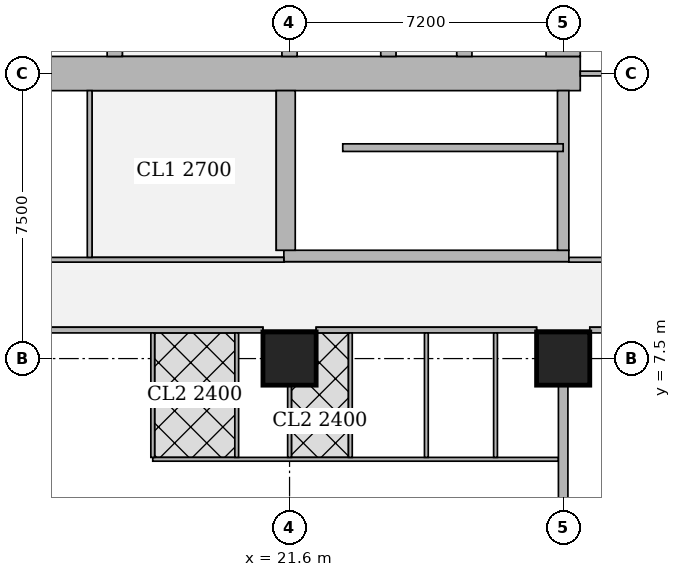
"""IFC4 building model, lengths in metres.
Left out: names, types, materials, properties, quantities, classifications, styles, units other than length and angle.
Written with IfcOpenShell. Run it as: python <this file> out.ifc"""

import sys

from ifc_helpers import new_model, si_unit, direction, frame, frame_2d, origin, origin_2d, place, context, subcontext, project, spatial, rectangle, extrude, element, fill, save


model = new_model("IFC4")
c1 = context("Model", 3, precision=1e-05, world=origin(), true_north=direction((0.0, 1.0)))
c2 = subcontext(c1, "Body", "Model", "MODEL_VIEW")
j1 = project(units=[si_unit("LENGTHUNIT", "METRE"), si_unit("PLANEANGLEUNIT", "RADIAN")], contexts=[c1])
p1 = place(None, origin())
s1 = spatial("IfcSite", under=j1, at=p1, CompositionType="ELEMENT")
p2 = place(p1, origin())
s2 = spatial("IfcBuilding", under=s1, at=p2, CompositionType="ELEMENT")
p3 = place(p2, frame((0.0, 0.0, 193.7)))
s3 = spatial("IfcBuildingStorey", under=s2, at=p3, CompositionType="ELEMENT", Elevation=193.7)
for number, where, z_axis, x_axis in (
    (1, (21.6, 7.5, 0.0), (0.0, 0.0, 1.0), (1.0, 0.0, 0.0)),
    (2, (28.8, 7.5, 0.0), (0.0, 0.0, 1.0), (1.0, 0.0, 0.0)),
):
    element("IfcColumn", number, at=place(p3, frame(where, z_axis=z_axis, x_axis=x_axis)), inside=s3, PredefinedType="COLUMN", context=c2, shape_type="SweptSolid", body=[
        extrude(rectangle(XDim=1.4, YDim=1.4, at=origin_2d()), origin(), (0.0, 0.0, 1.0), 3.75),
    ])
p4 = place(p3, frame((13.95, 15.0, 0.0), z_axis=(0.0, 0.0, 1.0), x_axis=(1.0, 0.0, 0.0)))
e3 = element("IfcWall", 3, at=p4, inside=s3, PredefinedType="SHEAR", context=c2, shape_type="SweptSolid", body=[
    extrude(rectangle(XDim=15.3, YDim=0.9, at=frame_2d((7.65, 0.0))), origin(), (0.0, 0.0, 1.0), 3.75),
])
p5 = place(p4, frame((4.45, 0.0, 0.0)))
e4 = element("IfcOpeningElement", 4, at=p5, cuts=e3, PredefinedType="OPENING", context=c2, shape_type="SweptSolid", body=[
    extrude(rectangle(XDim=1.8, YDim=2.1, at=frame_2d((0.9, 1.05))), frame((0.0, 0.46, 0.0), z_axis=(0.0, -1.0, 0.0), x_axis=(1.0, 0.0, 0.0)), (0.0, 0.0, 1.0), 0.92),
])
p6 = place(p4, frame((10.7, 0.0, 0.0)))
e5 = element("IfcOpeningElement", 5, at=p6, cuts=e3, PredefinedType="OPENING", context=c2, shape_type="SweptSolid", body=[
    extrude(rectangle(XDim=1.1, YDim=2.1, at=frame_2d((0.55, 1.05))), frame((0.0, 0.46, 0.0), z_axis=(0.0, -1.0, 0.0), x_axis=(1.0, 0.0, 0.0)), (0.0, 0.0, 1.0), 0.92),
])
p7 = place(p3, frame((28.8, 15.45, 0.0), z_axis=(0.0, 0.0, 1.0), x_axis=(0.0, 1.0, 0.0)))
e6 = element("IfcWall", 6, at=p7, inside=s3, PredefinedType="SHEAR", context=c2, shape_type="SweptSolid", body=[
    extrude(rectangle(XDim=14.1, YDim=0.9, at=frame_2d((7.05, 0.0))), origin(), (0.0, 0.0, 1.0), 3.75),
])
p8 = place(p3, frame((17.0, 15.45, 0.0), z_axis=(0.0, 0.0, 1.0), x_axis=(0.0, 1.0, 0.0)))
e7 = element("IfcWall", 7, at=p8, inside=s3, PredefinedType="SHEAR", context=c2, shape_type="SweptSolid", body=[
    extrude(rectangle(XDim=14.1, YDim=0.4, at=frame_2d((7.05, 0.0))), origin(), (0.0, 0.0, 1.0), 3.75),
])
p9 = place(p8, frame((0.925, 0.0, 0.0)))
e8 = element("IfcOpeningElement", 8, at=p9, cuts=e7, PredefinedType="OPENING", context=c2, shape_type="SweptSolid", body=[
    extrude(rectangle(XDim=1.0, YDim=2.1, at=frame_2d((0.5, 1.05))), frame((0.0, 0.21, 0.0), z_axis=(0.0, -1.0, 0.0), x_axis=(1.0, 0.0, 0.0)), (0.0, 0.0, 1.0), 0.42),
])
p10 = place(p8, frame((4.675, 0.0, 0.0)))
e9 = element("IfcOpeningElement", 9, at=p10, cuts=e7, PredefinedType="OPENING", context=c2, shape_type="SweptSolid", body=[
    extrude(rectangle(XDim=1.0, YDim=2.1, at=frame_2d((0.5, 1.05))), frame((0.0, 0.21, 0.0), z_axis=(0.0, -1.0, 0.0), x_axis=(1.0, 0.0, 0.0)), (0.0, 0.0, 1.0), 0.42),
])
p11 = place(p8, frame((8.425, 0.0, 0.0)))
e10 = element("IfcOpeningElement", 10, at=p11, cuts=e7, PredefinedType="OPENING", context=c2, shape_type="SweptSolid", body=[
    extrude(rectangle(XDim=1.0, YDim=2.1, at=frame_2d((0.5, 1.05))), frame((0.0, 0.21, 0.0), z_axis=(0.0, -1.0, 0.0), x_axis=(1.0, 0.0, 0.0)), (0.0, 0.0, 1.0), 0.42),
])
p12 = place(p8, frame((12.175, 0.0, 0.0)))
e11 = element("IfcOpeningElement", 11, at=p12, cuts=e7, PredefinedType="OPENING", context=c2, shape_type="SweptSolid", body=[
    extrude(rectangle(XDim=1.0, YDim=2.1, at=frame_2d((0.5, 1.05))), frame((0.0, 0.21, 0.0), z_axis=(0.0, -1.0, 0.0), x_axis=(1.0, 0.0, 0.0)), (0.0, 0.0, 1.0), 0.42),
])
p13 = place(p3, frame((21.6, 15.45, 0.0), z_axis=(0.0, 0.0, 1.0), x_axis=(0.0, 1.0, 0.0)))
e12 = element("IfcWall", 12, at=p13, inside=s3, PredefinedType="SHEAR", context=c2, shape_type="SweptSolid", body=[
    extrude(rectangle(XDim=14.1, YDim=0.4, at=frame_2d((7.05, 0.0))), origin(), (0.0, 0.0, 1.0), 3.75),
])
p14 = place(p13, frame((0.875, 0.0, 0.0)))
e13 = element("IfcOpeningElement", 13, at=p14, cuts=e12, PredefinedType="OPENING", context=c2, shape_type="SweptSolid", body=[
    extrude(rectangle(XDim=1.1, YDim=2.1, at=frame_2d((0.55, 1.05))), frame((0.0, 0.21, 0.0), z_axis=(0.0, -1.0, 0.0), x_axis=(1.0, 0.0, 0.0)), (0.0, 0.0, 1.0), 0.42),
])
p15 = place(p13, frame((4.625, 0.0, 0.0)))
e14 = element("IfcOpeningElement", 14, at=p15, cuts=e12, PredefinedType="OPENING", context=c2, shape_type="SweptSolid", body=[
    extrude(rectangle(XDim=1.1, YDim=2.1, at=frame_2d((0.55, 1.05))), frame((0.0, 0.21, 0.0), z_axis=(0.0, -1.0, 0.0), x_axis=(1.0, 0.0, 0.0)), (0.0, 0.0, 1.0), 0.42),
])
p16 = place(p13, frame((8.375, 0.0, 0.0)))
e15 = element("IfcOpeningElement", 15, at=p16, cuts=e12, PredefinedType="OPENING", context=c2, shape_type="SweptSolid", body=[
    extrude(rectangle(XDim=1.1, YDim=2.1, at=frame_2d((0.55, 1.05))), frame((0.0, 0.21, 0.0), z_axis=(0.0, -1.0, 0.0), x_axis=(1.0, 0.0, 0.0)), (0.0, 0.0, 1.0), 0.42),
])
p17 = place(p13, frame((12.125, 0.0, 0.0)))
e16 = element("IfcOpeningElement", 16, at=p17, cuts=e12, PredefinedType="OPENING", context=c2, shape_type="SweptSolid", body=[
    extrude(rectangle(XDim=1.1, YDim=2.1, at=frame_2d((0.55, 1.05))), frame((0.0, 0.21, 0.0), z_axis=(0.0, -1.0, 0.0), x_axis=(1.0, 0.0, 0.0)), (0.0, 0.0, 1.0), 0.42),
])
p18 = place(p3, frame((24.2, 15.45, 0.0), z_axis=(0.0, 0.0, 1.0), x_axis=(0.0, 1.0, 0.0)))
e17 = element("IfcWall", 17, at=p18, inside=s3, PredefinedType="SHEAR", context=c2, shape_type="SweptSolid", body=[
    extrude(rectangle(XDim=14.1, YDim=0.4, at=frame_2d((7.05, 0.0))), origin(), (0.0, 0.0, 1.0), 3.75),
])
p19 = place(p3, frame((26.2, 15.45, 0.0), z_axis=(0.0, 0.0, 1.0), x_axis=(0.0, 1.0, 0.0)))
e18 = element("IfcWall", 18, at=p19, inside=s3, PredefinedType="SHEAR", context=c2, shape_type="SweptSolid", body=[
    extrude(rectangle(XDim=3.1, YDim=0.4, at=frame_2d((1.55, 0.0))), origin(), (0.0, 0.0, 1.0), 3.75),
])
p20 = place(p19, frame((0.825, 0.0, 0.0)))
e19 = element("IfcOpeningElement", 19, at=p20, cuts=e18, PredefinedType="OPENING", context=c2, shape_type="SweptSolid", body=[
    extrude(rectangle(XDim=1.2, YDim=2.1, at=frame_2d((0.6, 1.05))), frame((0.0, 0.21, 0.0), z_axis=(0.0, -1.0, 0.0), x_axis=(1.0, 0.0, 0.0)), (0.0, 0.0, 1.0), 0.42),
])
p21 = place(p3, frame((21.45, 10.2, 0.0), z_axis=(0.0, 0.0, 1.0), x_axis=(1.0, 0.0, 0.0)))
e20 = element("IfcWall", 20, at=p21, inside=s3, PredefinedType="SHEAR", context=c2, shape_type="SweptSolid", body=[
    extrude(rectangle(XDim=7.5, YDim=0.3, at=frame_2d((3.75, 0.0))), origin(), (0.0, 0.0, 1.0), 3.75),
])
p22 = place(p21, frame((0.5, 0.0, 0.0)))
e21 = element("IfcOpeningElement", 21, at=p22, cuts=e20, PredefinedType="OPENING", context=c2, shape_type="SweptSolid", body=[
    extrude(rectangle(XDim=1.1, YDim=2.1, at=frame_2d((0.55, 1.05))), frame((0.0, 0.16, 0.0), z_axis=(0.0, -1.0, 0.0), x_axis=(1.0, 0.0, 0.0)), (0.0, 0.0, 1.0), 0.32),
])
p23 = place(p3, frame((21.5, 10.35, 0.0), z_axis=(0.0, 0.0, 1.0), x_axis=(0.0, 1.0, 0.0)))
e22 = element("IfcWall", 22, at=p23, inside=s3, PredefinedType="SHEAR", context=c2, shape_type="SweptSolid", body=[
    extrude(rectangle(XDim=4.2, YDim=0.5, at=frame_2d((2.1, 0.0))), origin(), (0.0, 0.0, 1.0), 3.75),
])
p24 = place(p3, frame((28.8, 10.35, 0.0), z_axis=(0.0, 0.0, 1.0), x_axis=(0.0, 1.0, 0.0)))
e23 = element("IfcWall", 23, at=p24, inside=s3, PredefinedType="SHEAR", context=c2, shape_type="SweptSolid", body=[
    extrude(rectangle(XDim=4.2, YDim=0.3, at=frame_2d((2.1, 0.0))), origin(), (0.0, 0.0, 1.0), 3.75),
])
p25 = place(p3, frame((35.299, 8.25, 0.0), z_axis=(0.0, 0.0, 1.0), x_axis=(-1.0, 0.0, 0.0)))
e24 = element("IfcWall", 24, at=p25, inside=s3, PredefinedType="SOLIDWALL", context=c2, shape_type="SweptSolid", body=[
    extrude(rectangle(XDim=5.798, YDim=0.15, at=frame_2d((2.899, 0.0))), origin(), (0.0, 0.0, 1.0), 3.5),
])
p26 = place(p25, frame((3.999, 0.0, 0.0)))
e25 = element("IfcOpeningElement", 25, at=p26, cuts=e24, PredefinedType="OPENING", context=c2, shape_type="SweptSolid", body=[
    extrude(rectangle(XDim=1.0, YDim=2.1, at=frame_2d((0.5, 1.05))), frame((0.0, 0.085, 0.0), z_axis=(0.0, -1.0, 0.0), x_axis=(1.0, 0.0, 0.0)), (0.0, 0.0, 1.0), 0.17),
])
p27 = place(p3, frame((28.099, 8.25, 0.0), z_axis=(0.0, 0.0, 1.0), x_axis=(-1.0, 0.0, 0.0)))
e26 = element("IfcWall", 26, at=p27, inside=s3, PredefinedType="SOLIDWALL", context=c2, shape_type="SweptSolid", body=[
    extrude(rectangle(XDim=5.798, YDim=0.15, at=frame_2d((2.899, 0.0))), origin(), (0.0, 0.0, 1.0), 3.5),
])
p28 = place(p3, frame((20.899, 8.25, 0.0), z_axis=(0.0, 0.0, 1.0), x_axis=(-1.0, 0.0, 0.0)))
e27 = element("IfcWall", 27, at=p28, inside=s3, PredefinedType="SOLIDWALL", context=c2, shape_type="SweptSolid", body=[
    extrude(rectangle(XDim=5.798, YDim=0.15, at=frame_2d((2.899, 0.0))), origin(), (0.0, 0.0, 1.0), 3.5),
])
p29 = place(p28, frame((3.999, 0.0, 0.0)))
e28 = element("IfcOpeningElement", 28, at=p29, cuts=e27, PredefinedType="OPENING", context=c2, shape_type="SweptSolid", body=[
    extrude(rectangle(XDim=1.0, YDim=2.1, at=frame_2d((0.5, 1.05))), frame((0.0, 0.085, 0.0), z_axis=(0.0, -1.0, 0.0), x_axis=(1.0, 0.0, 0.0)), (0.0, 0.0, 1.0), 0.17),
])
p30 = place(p3, frame((28.675, 4.85, 0.0), z_axis=(0.0, 0.0, 1.0), x_axis=(-1.0, 0.0, 0.0)))
e29 = element("IfcWall", 29, at=p30, inside=s3, PredefinedType="PARTITIONING", context=c2, shape_type="SweptSolid", body=[
    extrude(rectangle(XDim=10.675, YDim=0.1, at=frame_2d((5.337, 0.0))), origin(), (0.0, 0.0, 1.0), 3.5),
])
p31 = place(p30, frame((9.12, 0.0, 0.0)))
e30 = element("IfcOpeningElement", 30, at=p31, cuts=e29, PredefinedType="OPENING", context=c2, shape_type="SweptSolid", body=[
    extrude(rectangle(XDim=0.9, YDim=2.1, at=frame_2d((0.45, 1.05))), frame((0.0, 0.06, 0.0), z_axis=(0.0, -1.0, 0.0), x_axis=(1.0, 0.0, 0.0)), (0.0, 0.0, 1.0), 0.12),
])
p32 = place(p30, frame((5.825, 0.0, 0.0)))
e31 = element("IfcOpeningElement", 31, at=p32, cuts=e29, PredefinedType="OPENING", context=c2, shape_type="SweptSolid", body=[
    extrude(rectangle(XDim=0.9, YDim=2.1, at=frame_2d((0.45, 1.05))), frame((0.0, 0.06, 0.0), z_axis=(0.0, -1.0, 0.0), x_axis=(1.0, 0.0, 0.0)), (0.0, 0.0, 1.0), 0.12),
])
p33 = place(p30, frame((2.115, 0.0, 0.0)))
e32 = element("IfcOpeningElement", 32, at=p33, cuts=e29, PredefinedType="OPENING", context=c2, shape_type="SweptSolid", body=[
    extrude(rectangle(XDim=0.9, YDim=2.1, at=frame_2d((0.45, 1.05))), frame((0.0, 0.06, 0.0), z_axis=(0.0, -1.0, 0.0), x_axis=(1.0, 0.0, 0.0)), (0.0, 0.0, 1.0), 0.12),
])
p34 = place(p30, frame((7.32, 0.0, 0.0)))
e33 = element("IfcOpeningElement", 33, at=p34, cuts=e29, PredefinedType="OPENING", context=c2, shape_type="SweptSolid", body=[
    extrude(rectangle(XDim=0.9, YDim=2.1, at=frame_2d((0.45, 1.05))), frame((0.0, 0.06, 0.0), z_axis=(0.0, -1.0, 0.0), x_axis=(1.0, 0.0, 0.0)), (0.0, 0.0, 1.0), 0.12),
])
p35 = place(p30, frame((4.025, 0.0, 0.0)))
e34 = element("IfcOpeningElement", 34, at=p35, cuts=e29, PredefinedType="OPENING", context=c2, shape_type="SweptSolid", body=[
    extrude(rectangle(XDim=0.9, YDim=2.1, at=frame_2d((0.45, 1.05))), frame((0.0, 0.06, 0.0), z_axis=(0.0, -1.0, 0.0), x_axis=(1.0, 0.0, 0.0)), (0.0, 0.0, 1.0), 0.12),
])
p36 = place(p30, frame((0.315, 0.0, 0.0)))
e35 = element("IfcOpeningElement", 35, at=p36, cuts=e29, PredefinedType="OPENING", context=c2, shape_type="SweptSolid", body=[
    extrude(rectangle(XDim=0.9, YDim=2.1, at=frame_2d((0.45, 1.05))), frame((0.0, 0.06, 0.0), z_axis=(0.0, -1.0, 0.0), x_axis=(1.0, 0.0, 0.0)), (0.0, 0.0, 1.0), 0.12),
])
p37 = place(p3, frame((18.0, 4.9, 0.0), z_axis=(0.0, 0.0, 1.0), x_axis=(0.0, 1.0, 0.0)))
e36 = element("IfcWall", 36, at=p37, inside=s3, PredefinedType="PARTITIONING", context=c2, shape_type="SweptSolid", body=[
    extrude(rectangle(XDim=3.275, YDim=0.1, at=frame_2d((1.638, 0.0))), origin(), (0.0, 0.0, 1.0), 3.5),
])
p38 = place(p3, frame((21.6, 4.9, 0.0), z_axis=(0.0, 0.0, 1.0), x_axis=(0.0, 1.0, 0.0)))
e37 = element("IfcWall", 37, at=p38, inside=s3, PredefinedType="PARTITIONING", context=c2, shape_type="SweptSolid", body=[
    extrude(rectangle(XDim=1.899, YDim=0.1, at=frame_2d((0.95, 0.0))), origin(), (0.0, 0.0, 1.0), 3.5),
])
for number, where, z_axis, x_axis in (
    (38, (25.2, 4.9, 0.0), (0.0, 0.0, 1.0), (0.0, 1.0, 0.0)),
    (39, (20.21, 4.9, 0.0), (0.0, 0.0, 1.0), (0.0, 1.0, 0.0)),
    (40, (23.2, 4.9, 0.0), (0.0, 0.0, 1.0), (0.0, 1.0, 0.0)),
    (41, (27.02, 4.9, 0.0), (0.0, 0.0, 1.0), (0.0, 1.0, 0.0)),
):
    element("IfcWall", number, at=place(p3, frame(where, z_axis=z_axis, x_axis=x_axis)), inside=s3, PredefinedType="PARTITIONING", context=c2, shape_type="SweptSolid", body=[
        extrude(rectangle(XDim=3.275, YDim=0.1, at=frame_2d((1.638, 0.0))), origin(), (0.0, 0.0, 1.0), 3.5),
    ])
p39 = place(p3, frame((28.8, 3.65, 0.0), z_axis=(0.0, 0.0, 1.0), x_axis=(0.0, 1.0, 0.0)))
e42 = element("IfcWall", 42, at=p39, inside=s3, PredefinedType="SOLIDWALL", context=c2, shape_type="SweptSolid", body=[
    extrude(rectangle(XDim=3.149, YDim=0.25, at=frame_2d((1.575, 0.0))), origin(), (0.0, 0.0, 1.0), 3.5),
])
p40 = place(p3, frame((10.713, 10.1, 0.0), z_axis=(0.0, 0.0, 1.0), x_axis=(1.0, 0.0, 0.0)))
e43 = element("IfcWall", 43, at=p40, inside=s3, PredefinedType="PARTITIONING", context=c2, shape_type="SweptSolid", body=[
    extrude(rectangle(XDim=10.737, YDim=0.125, at=frame_2d((5.369, 0.0))), origin(), (0.0, 0.0, 1.0), 3.5),
])
p41 = place(p40, frame((7.282, 0.0, 0.0)))
e44 = element("IfcOpeningElement", 44, at=p41, cuts=e43, PredefinedType="OPENING", context=c2, shape_type="SweptSolid", body=[
    extrude(rectangle(XDim=1.8, YDim=2.1, at=frame_2d((0.9, 1.05))), frame((0.0, 0.073, 0.0), z_axis=(0.0, -1.0, 0.0), x_axis=(1.0, 0.0, 0.0)), (0.0, 0.0, 1.0), 0.145),
])
p42 = place(p3, frame((16.34, 10.163, 0.0), z_axis=(0.0, 0.0, 1.0), x_axis=(0.0, 1.0, 0.0)))
e45 = element("IfcWall", 45, at=p42, inside=s3, PredefinedType="PARTITIONING", context=c2, shape_type="SweptSolid", body=[
    extrude(rectangle(XDim=4.387, YDim=0.125, at=frame_2d((2.193, 0.0))), origin(), (0.0, 0.0, 1.0), 3.5),
])
p43 = place(p42, frame((1.637, 0.0, 0.0)))
e46 = element("IfcOpeningElement", 46, at=p43, cuts=e45, PredefinedType="OPENING", context=c2, shape_type="SweptSolid", body=[
    extrude(rectangle(XDim=1.0, YDim=2.1, at=frame_2d((0.5, 1.05))), frame((0.0, 0.073, 0.0), z_axis=(0.0, -1.0, 0.0), x_axis=(1.0, 0.0, 0.0)), (0.0, 0.0, 1.0), 0.145),
])
p44 = place(p3, frame((28.95, 10.1, 0.0), z_axis=(0.0, 0.0, 1.0), x_axis=(1.0, 0.0, 0.0)))
e47 = element("IfcWall", 47, at=p44, inside=s3, PredefinedType="PARTITIONING", context=c2, shape_type="SweptSolid", body=[
    extrude(rectangle(XDim=9.188, YDim=0.125, at=frame_2d((4.594, 0.0))), origin(), (0.0, 0.0, 1.0), 3.5),
])
p45 = place(p3, frame((29.25, 15.0, 0.0), z_axis=(0.0, 0.0, 1.0), x_axis=(1.0, 0.0, 0.0)))
e48 = element("IfcWall", 48, at=p45, inside=s3, PredefinedType="PARTITIONING", context=c2, shape_type="SweptSolid", body=[
    extrude(rectangle(XDim=6.049, YDim=0.125, at=frame_2d((3.024, 0.0))), origin(), (0.0, 0.0, 1.0), 3.5),
])
p46 = place(p3, frame((23.0, 13.05, 0.0), z_axis=(0.0, 0.0, 1.0), x_axis=(1.0, 0.0, 0.0)))
e49 = element("IfcWall", 49, at=p46, inside=s3, PredefinedType="SHEAR", context=c2, shape_type="SweptSolid", body=[
    extrude(rectangle(XDim=5.8, YDim=0.2, at=frame_2d((2.9, 0.0))), origin(), (0.0, 0.0, 1.0), 3.75),
])
p47 = place(p31, origin())
e50 = element("IfcDoor", 50, at=p47, inside=s3, OperationType="SINGLE_SWING_LEFT", PredefinedType="DOOR", context=c2, shape_type="SweptSolid", body=[
    extrude(rectangle(XDim=0.9, YDim=2.1, at=frame_2d((0.45, 1.05))), frame((0.0, 0.025, 0.0), z_axis=(0.0, -1.0, 0.0), x_axis=(1.0, 0.0, 0.0)), (0.0, 0.0, 1.0), 0.05),
])
fill(e30, e50)
p48 = place(p32, origin())
e51 = element("IfcDoor", 51, at=p48, inside=s3, OperationType="SINGLE_SWING_RIGHT", PredefinedType="DOOR", context=c2, shape_type="SweptSolid", body=[
    extrude(rectangle(XDim=0.9, YDim=2.1, at=frame_2d((0.45, 1.05))), frame((0.0, 0.025, 0.0), z_axis=(0.0, -1.0, 0.0), x_axis=(1.0, 0.0, 0.0)), (0.0, 0.0, 1.0), 0.05),
])
fill(e31, e51)
p49 = place(p33, origin())
e52 = element("IfcDoor", 52, at=p49, inside=s3, OperationType="SINGLE_SWING_RIGHT", PredefinedType="DOOR", context=c2, shape_type="SweptSolid", body=[
    extrude(rectangle(XDim=0.9, YDim=2.1, at=frame_2d((0.45, 1.05))), frame((0.0, 0.025, 0.0), z_axis=(0.0, -1.0, 0.0), x_axis=(1.0, 0.0, 0.0)), (0.0, 0.0, 1.0), 0.05),
])
fill(e32, e52)
p50 = place(p34, origin())
e53 = element("IfcDoor", 53, at=p50, inside=s3, OperationType="SINGLE_SWING_LEFT", PredefinedType="DOOR", context=c2, shape_type="SweptSolid", body=[
    extrude(rectangle(XDim=0.9, YDim=2.1, at=frame_2d((0.45, 1.05))), frame((0.0, 0.025, 0.0), z_axis=(0.0, -1.0, 0.0), x_axis=(1.0, 0.0, 0.0)), (0.0, 0.0, 1.0), 0.05),
])
fill(e33, e53)
p51 = place(p35, origin())
e54 = element("IfcDoor", 54, at=p51, inside=s3, OperationType="SINGLE_SWING_LEFT", PredefinedType="DOOR", context=c2, shape_type="SweptSolid", body=[
    extrude(rectangle(XDim=0.9, YDim=2.1, at=frame_2d((0.45, 1.05))), frame((0.0, 0.025, 0.0), z_axis=(0.0, -1.0, 0.0), x_axis=(1.0, 0.0, 0.0)), (0.0, 0.0, 1.0), 0.05),
])
fill(e34, e54)
p52 = place(p36, origin())
e55 = element("IfcDoor", 55, at=p52, inside=s3, OperationType="SINGLE_SWING_RIGHT", PredefinedType="DOOR", context=c2, shape_type="SweptSolid", body=[
    extrude(rectangle(XDim=0.9, YDim=2.1, at=frame_2d((0.45, 1.05))), frame((0.0, 0.025, 0.0), z_axis=(0.0, -1.0, 0.0), x_axis=(1.0, 0.0, 0.0)), (0.0, 0.0, 1.0), 0.05),
])
fill(e35, e55)
p53 = place(p29, origin())
e56 = element("IfcDoor", 56, at=p53, inside=s3, OperationType="SINGLE_SWING_RIGHT", PredefinedType="DOOR", context=c2, shape_type="SweptSolid", body=[
    extrude(rectangle(XDim=1.0, YDim=2.1, at=frame_2d((0.5, 1.05))), frame((0.0, 0.025, 0.0), z_axis=(0.0, -1.0, 0.0), x_axis=(1.0, 0.0, 0.0)), (0.0, 0.0, 1.0), 0.05),
])
fill(e28, e56)
p54 = place(p43, origin())
e57 = element("IfcDoor", 57, at=p54, inside=s3, OperationType="SINGLE_SWING_LEFT", PredefinedType="DOOR", context=c2, shape_type="SweptSolid", body=[
    extrude(rectangle(XDim=1.0, YDim=2.1, at=frame_2d((0.5, 1.05))), frame((0.0, 0.025, 0.0), z_axis=(0.0, -1.0, 0.0), x_axis=(1.0, 0.0, 0.0)), (0.0, 0.0, 1.0), 0.05),
])
fill(e46, e57)
p55 = place(p41, origin())
e58 = element("IfcDoor", 58, at=p55, inside=s3, OperationType="DOUBLE_DOOR_SINGLE_SWING", PredefinedType="DOOR", context=c2, shape_type="SweptSolid", body=[
    extrude(rectangle(XDim=1.8, YDim=2.1, at=frame_2d((0.9, 1.05))), frame((0.0, 0.025, 0.0), z_axis=(0.0, -1.0, 0.0), x_axis=(1.0, 0.0, 0.0)), (0.0, 0.0, 1.0), 0.05),
])
fill(e44, e58)
p56 = place(p5, origin())
e59 = element("IfcDoor", 59, at=p56, inside=s3, OperationType="DOUBLE_DOOR_SINGLE_SWING", PredefinedType="DOOR", context=c2, shape_type="SweptSolid", body=[
    extrude(rectangle(XDim=1.8, YDim=2.1, at=frame_2d((0.9, 1.05))), frame((0.0, 0.025, 0.0), z_axis=(0.0, -1.0, 0.0), x_axis=(1.0, 0.0, 0.0)), (0.0, 0.0, 1.0), 0.05),
])
fill(e4, e59)
p57 = place(p6, origin())
e60 = element("IfcDoor", 60, at=p57, inside=s3, OperationType="SINGLE_SWING_LEFT", PredefinedType="DOOR", context=c2, shape_type="SweptSolid", body=[
    extrude(rectangle(XDim=1.1, YDim=2.1, at=frame_2d((0.55, 1.05))), frame((0.0, 0.025, 0.0), z_axis=(0.0, -1.0, 0.0), x_axis=(1.0, 0.0, 0.0)), (0.0, 0.0, 1.0), 0.05),
])
fill(e5, e60)
p58 = place(p22, origin())
e61 = element("IfcDoor", 61, at=p58, inside=s3, OperationType="SINGLE_SWING_LEFT", PredefinedType="DOOR", context=c2, shape_type="SweptSolid", body=[
    extrude(rectangle(XDim=1.1, YDim=2.1, at=frame_2d((0.55, 1.05))), frame((0.0, 0.025, 0.0), z_axis=(0.0, -1.0, 0.0), x_axis=(1.0, 0.0, 0.0)), (0.0, 0.0, 1.0), 0.05),
])
fill(e21, e61)
save(model, sys.argv[1])
